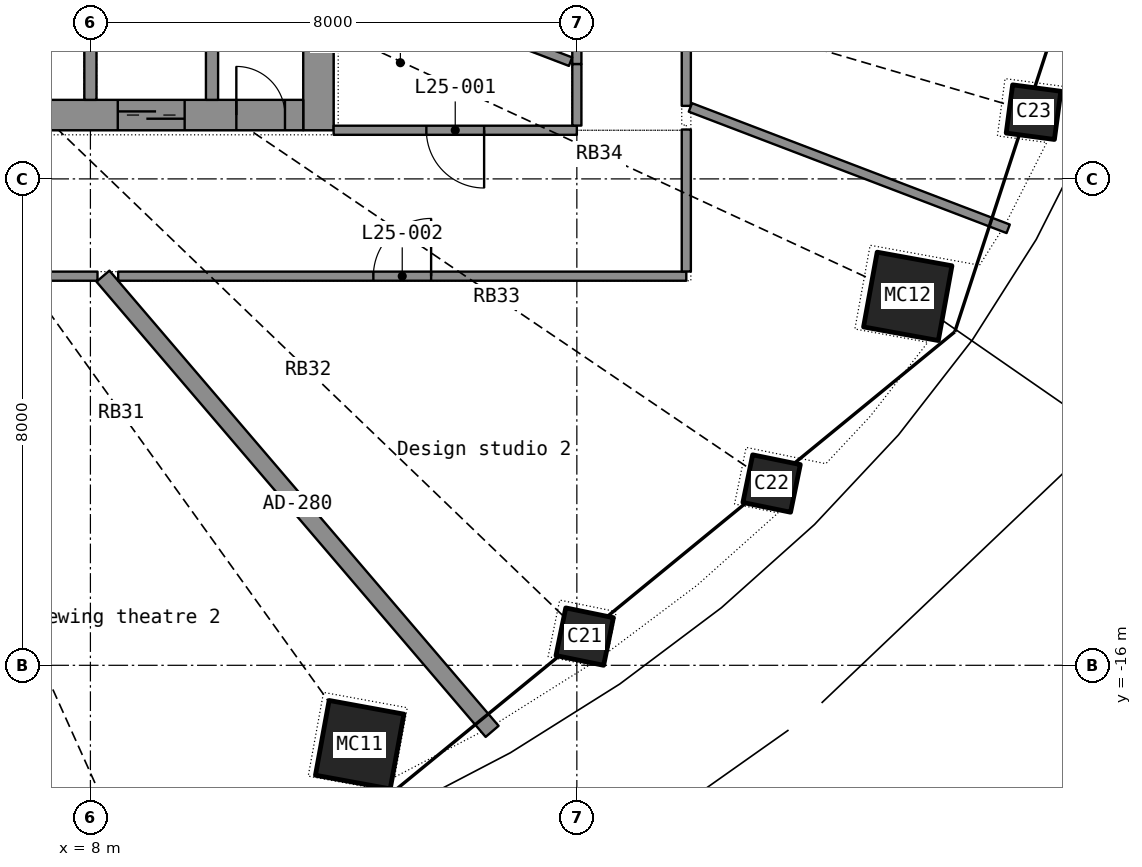
"""IFC4 building model, lengths in metres.
Left out: names, types, materials, properties, quantities, classifications, styles, units other than length and angle.
Written with IfcOpenShell. Run it as: python <this file> out.ifc"""

import sys

from ifc_helpers import new_model, si_unit, direction, frame, frame_2d, origin, origin_2d, place, context, subcontext, project, spatial, rectangle, hollow_rectangle, extrude, element, fill, save


model = new_model("IFC4")
c1 = context("Model", 3, precision=1e-05, world=origin(), true_north=direction((0.0, 1.0)))
c2 = subcontext(c1, "Body", "Model", "MODEL_VIEW")
j1 = project(units=[si_unit("LENGTHUNIT", "METRE"), si_unit("PLANEANGLEUNIT", "RADIAN")], contexts=[c1])
p1 = place(None, origin())
s1 = spatial("IfcSite", under=j1, at=p1, CompositionType="ELEMENT")
p2 = place(p1, origin())
s2 = spatial("IfcBuilding", under=s1, at=p2, CompositionType="ELEMENT")
p3 = place(p2, frame((0.0, 0.0, 108.2)))
s3 = spatial("IfcBuildingStorey", under=s2, at=p3, CompositionType="ELEMENT", Elevation=108.2)
p4 = place(p3, frame((12.428, -17.305, 0.0), z_axis=(-0.017280237, 0.024535299, 0.999549605), x_axis=(-0.907861934, -0.419234423, -0.005404462)))
e1 = element("IfcColumn", 1, at=p4, inside=s3, PredefinedType="COLUMN", context=c2, shape_type="SweptSolid", body=[
    extrude(hollow_rectangle(XDim=1.25, YDim=1.25, WallThickness=0.032, at=origin_2d()), origin(), (0.0, 0.0, 1.0), 3.702),
])
p5 = place(p3, frame((16.129, -15.528, 0.0), z_axis=(-0.022226124, 0.021764453, 0.999516037), x_axis=(-0.828818938, -0.559482024, -0.006247635)))
e2 = element("IfcColumn", 2, at=p5, inside=s3, PredefinedType="COLUMN", context=c2, shape_type="SweptSolid", body=[
    extrude(hollow_rectangle(XDim=0.8, YDim=0.8, WallThickness=0.025, at=origin_2d()), origin(), (0.0, 0.0, 1.0), 3.702),
])
p6 = place(p3, frame((19.203, -13.01, 0.0), z_axis=(-0.026512179, 0.018202391, 0.999482755), x_axis=(-0.719802207, -0.694149234, -0.006451686)))
e3 = element("IfcColumn", 3, at=p6, inside=s3, PredefinedType="COLUMN", context=c2, shape_type="SweptSolid", body=[
    extrude(hollow_rectangle(XDim=0.8, YDim=0.8, WallThickness=0.025, at=origin_2d()), origin(), (0.0, 0.0, 1.0), 3.702),
])
p7 = place(p3, frame((21.442, -9.932, 0.0), z_axis=(-0.029940667, 0.01417895, 0.999451106), x_axis=(-0.582966761, -0.812474307, -0.00593764)))
e4 = element("IfcColumn", 4, at=p7, inside=s3, PredefinedType="COLUMN", context=c2, shape_type="SweptSolid", body=[
    extrude(hollow_rectangle(XDim=1.25, YDim=1.25, WallThickness=0.032, at=origin_2d()), origin(), (0.0, 0.0, 1.0), 3.702),
])
p8 = place(p3, frame((23.51, -6.902, 0.0), z_axis=(-0.032511791, 0.009694185, 0.999424337), x_axis=(-0.409837945, -0.912147328, -0.004484622)))
e5 = element("IfcColumn", 5, at=p8, inside=s3, PredefinedType="COLUMN", context=c2, shape_type="SweptSolid", body=[
    extrude(hollow_rectangle(XDim=0.8, YDim=0.8, WallThickness=0.025, at=origin_2d()), origin(), (0.0, 0.0, 1.0), 3.702),
])
p9 = place(p3, frame((11.75, -7.2, 0.0), z_axis=(0.0, 0.0, 1.0), x_axis=(0.0, 1.0, 0.0)))
e6 = element("IfcWall", 6, at=p9, inside=s3, PredefinedType="SHEAR", context=c2, shape_type="SweptSolid", body=[
    extrude(rectangle(XDim=14.4, YDim=0.5, at=frame_2d((7.2, 0.0))), origin(), (0.0, 0.0, 1.0), 3.3),
])
p10 = place(p9, frame((6.5, 0.0, 0.0)))
e7 = element("IfcOpeningElement", 7, at=p10, cuts=e6, PredefinedType="OPENING", context=c2, shape_type="SweptSolid", body=[
    extrude(rectangle(XDim=1.4, YDim=2.2, at=frame_2d((0.7, 1.1))), frame((0.0, 0.26, 0.0), z_axis=(0.0, -1.0, 0.0), x_axis=(1.0, 0.0, 0.0)), (0.0, 0.0, 1.0), 0.52),
])
p11 = place(p3, frame((-11.5, -6.95, 0.0), z_axis=(0.0, 0.0, 1.0), x_axis=(1.0, 0.0, 0.0)))
e8 = element("IfcWall", 8, at=p11, inside=s3, PredefinedType="SHEAR", context=c2, shape_type="SweptSolid", body=[
    extrude(rectangle(XDim=23.0, YDim=0.5, at=frame_2d((11.5, 0.0))), origin(), (0.0, 0.0, 1.0), 3.3),
])
p12 = place(p11, frame((1.95, 0.0, 0.0)))
e9 = element("IfcOpeningElement", 9, at=p12, cuts=e8, PredefinedType="OPENING", context=c2, shape_type="SweptSolid", body=[
    extrude(rectangle(XDim=1.1, YDim=2.2, at=frame_2d((0.55, 1.1))), frame((0.0, 0.26, 0.0), z_axis=(0.0, -1.0, 0.0), x_axis=(1.0, 0.0, 0.0)), (0.0, 0.0, 1.0), 0.52),
])
p13 = place(p11, frame((3.95, 0.0, 0.0)))
e10 = element("IfcOpeningElement", 10, at=p13, cuts=e8, PredefinedType="OPENING", context=c2, shape_type="SweptSolid", body=[
    extrude(rectangle(XDim=1.1, YDim=2.2, at=frame_2d((0.55, 1.1))), frame((0.0, 0.26, 0.0), z_axis=(0.0, -1.0, 0.0), x_axis=(1.0, 0.0, 0.0)), (0.0, 0.0, 1.0), 0.52),
])
p14 = place(p11, frame((5.95, 0.0, 0.0)))
e11 = element("IfcOpeningElement", 11, at=p14, cuts=e8, PredefinedType="OPENING", context=c2, shape_type="SweptSolid", body=[
    extrude(rectangle(XDim=1.1, YDim=2.2, at=frame_2d((0.55, 1.1))), frame((0.0, 0.26, 0.0), z_axis=(0.0, -1.0, 0.0), x_axis=(1.0, 0.0, 0.0)), (0.0, 0.0, 1.0), 0.52),
])
p15 = place(p11, frame((7.95, 0.0, 0.0)))
e12 = element("IfcOpeningElement", 12, at=p15, cuts=e8, PredefinedType="OPENING", context=c2, shape_type="SweptSolid", body=[
    extrude(rectangle(XDim=1.1, YDim=2.2, at=frame_2d((0.55, 1.1))), frame((0.0, 0.26, 0.0), z_axis=(0.0, -1.0, 0.0), x_axis=(1.0, 0.0, 0.0)), (0.0, 0.0, 1.0), 0.52),
])
p16 = place(p11, frame((9.95, 0.0, 0.0)))
e13 = element("IfcOpeningElement", 13, at=p16, cuts=e8, PredefinedType="OPENING", context=c2, shape_type="SweptSolid", body=[
    extrude(rectangle(XDim=1.1, YDim=2.2, at=frame_2d((0.55, 1.1))), frame((0.0, 0.26, 0.0), z_axis=(0.0, -1.0, 0.0), x_axis=(1.0, 0.0, 0.0)), (0.0, 0.0, 1.0), 0.52),
])
p17 = place(p11, frame((11.95, 0.0, 0.0)))
e14 = element("IfcOpeningElement", 14, at=p17, cuts=e8, PredefinedType="OPENING", context=c2, shape_type="SweptSolid", body=[
    extrude(rectangle(XDim=1.1, YDim=2.2, at=frame_2d((0.55, 1.1))), frame((0.0, 0.26, 0.0), z_axis=(0.0, -1.0, 0.0), x_axis=(1.0, 0.0, 0.0)), (0.0, 0.0, 1.0), 0.52),
])
p18 = place(p11, frame((13.95, 0.0, 0.0)))
e15 = element("IfcOpeningElement", 15, at=p18, cuts=e8, PredefinedType="OPENING", context=c2, shape_type="SweptSolid", body=[
    extrude(rectangle(XDim=1.1, YDim=2.2, at=frame_2d((0.55, 1.1))), frame((0.0, 0.26, 0.0), z_axis=(0.0, -1.0, 0.0), x_axis=(1.0, 0.0, 0.0)), (0.0, 0.0, 1.0), 0.52),
])
p19 = place(p11, frame((15.95, 0.0, 0.0)))
e16 = element("IfcOpeningElement", 16, at=p19, cuts=e8, PredefinedType="OPENING", context=c2, shape_type="SweptSolid", body=[
    extrude(rectangle(XDim=1.1, YDim=2.2, at=frame_2d((0.55, 1.1))), frame((0.0, 0.26, 0.0), z_axis=(0.0, -1.0, 0.0), x_axis=(1.0, 0.0, 0.0)), (0.0, 0.0, 1.0), 0.52),
])
p20 = place(p11, frame((19.95, 0.0, 0.0)))
e17 = element("IfcOpeningElement", 17, at=p20, cuts=e8, PredefinedType="OPENING", context=c2, shape_type="SweptSolid", body=[
    extrude(rectangle(XDim=1.1, YDim=2.2, at=frame_2d((0.55, 1.1))), frame((0.0, 0.26, 0.0), z_axis=(0.0, -1.0, 0.0), x_axis=(1.0, 0.0, 0.0)), (0.0, 0.0, 1.0), 0.52),
])
p21 = place(p11, frame((0.3, 0.0, 0.0)))
e18 = element("IfcOpeningElement", 18, at=p21, cuts=e8, PredefinedType="OPENING", context=c2, shape_type="SweptSolid", body=[
    extrude(rectangle(XDim=0.8, YDim=2.05, at=frame_2d((0.4, 1.025))), frame((0.0, 0.26, 0.0), z_axis=(0.0, -1.0, 0.0), x_axis=(1.0, 0.0, 0.0)), (0.0, 0.0, 1.0), 0.52),
])
p22 = place(p11, frame((21.9, 0.0, 0.0)))
e19 = element("IfcOpeningElement", 19, at=p22, cuts=e8, PredefinedType="OPENING", context=c2, shape_type="SweptSolid", body=[
    extrude(rectangle(XDim=0.8, YDim=2.05, at=frame_2d((0.4, 1.025))), frame((0.0, 0.26, 0.0), z_axis=(0.0, -1.0, 0.0), x_axis=(1.0, 0.0, 0.0)), (0.0, 0.0, 1.0), 0.52),
])
for number, where, z_axis, x_axis in (
    (20, (8.0, -6.7, 0.0), (0.0, 0.0, 1.0), (0.0, 1.0, 0.0)),
    (21, (10.0, -6.7, 0.0), (0.0, 0.0, 1.0), (0.0, 1.0, 0.0)),
):
    element("IfcWall", number, at=place(p3, frame(where, z_axis=z_axis, x_axis=x_axis)), inside=s3, PredefinedType="SHEAR", context=c2, shape_type="SweptSolid", body=[
        extrude(rectangle(XDim=2.8, YDim=0.2, at=frame_2d((1.4, 0.0))), origin(), (0.0, 0.0, 1.0), 3.3),
    ])
p23 = place(p3, frame((17.8, -6.799, 0.0), z_axis=(0.0, 0.0, 1.0), x_axis=(0.0, 1.0, 0.0)))
e22 = element("IfcWall", 22, at=p23, inside=s3, PredefinedType="PARTITIONING", context=c2, shape_type="SweptSolid", body=[
    extrude(rectangle(XDim=13.598, YDim=0.15, at=frame_2d((6.799, 0.0))), origin(), (0.0, 0.0, 1.0), 2.4),
])
p24 = place(p23, frame((6.199, 0.0, 0.0)))
e23 = element("IfcOpeningElement", 23, at=p24, cuts=e22, PredefinedType="OPENING", context=c2, shape_type="SweptSolid", body=[
    extrude(rectangle(XDim=1.2, YDim=2.2, at=frame_2d((0.6, 1.1))), frame((0.0, 0.085, 0.0), z_axis=(0.0, -1.0, 0.0), x_axis=(1.0, 0.0, 0.0)), (0.0, 0.0, 1.0), 0.17),
])
p25 = place(p3, frame((8.206, -9.6, 0.0), z_axis=(0.0, 0.0, 1.0), x_axis=(0.649790619, -0.760113249, 0.0)))
e24 = element("IfcWall", 24, at=p25, inside=s3, PredefinedType="PARTITIONING", context=c2, shape_type="SweptSolid", body=[
    extrude(rectangle(XDim=9.85, YDim=0.28, at=frame_2d((4.925, 0.0))), origin(), (0.0, 0.0, 1.0), 2.4),
])
p26 = place(p3, frame((8.457, -9.6, 0.0), z_axis=(0.0, 0.0, 1.0), x_axis=(1.0, 0.0, 0.0)))
e25 = element("IfcWall", 25, at=p26, inside=s3, PredefinedType="PARTITIONING", context=c2, shape_type="SweptSolid", body=[
    extrude(rectangle(XDim=9.343, YDim=0.15, at=frame_2d((4.672, 0.0))), origin(), (0.0, 0.0, 1.0), 2.4),
])
p27 = place(p26, frame((4.197, 0.0, 0.0)))
e26 = element("IfcOpeningElement", 26, at=p27, cuts=e25, PredefinedType="OPENING", context=c2, shape_type="SweptSolid", body=[
    extrude(rectangle(XDim=0.95, YDim=2.15, at=frame_2d((0.475, 1.075))), frame((0.0, 0.085, 0.0), z_axis=(0.0, -1.0, 0.0), x_axis=(1.0, 0.0, 0.0)), (0.0, 0.0, 1.0), 0.17),
])
p28 = place(p3, frame((23.094, -8.821, 0.0), z_axis=(0.0, 0.0, 1.0), x_axis=(-0.934174226, 0.356817201, 0.0)))
e27 = element("IfcWall", 27, at=p28, inside=s3, PredefinedType="PARTITIONING", context=c2, shape_type="SweptSolid", body=[
    extrude(rectangle(XDim=5.595, YDim=0.15, at=frame_2d((2.797, 0.0))), origin(), (0.0, 0.0, 1.0), 2.4),
])
p29 = place(p3, frame((16.0, -0.9, 0.0), z_axis=(0.0, 0.0, 1.0), x_axis=(0.0, -1.0, 0.0)))
e28 = element("IfcWall", 28, at=p29, inside=s3, PredefinedType="PARTITIONING", context=c2, shape_type="SweptSolid", body=[
    extrude(rectangle(XDim=5.211, YDim=0.15, at=frame_2d((2.606, 0.0))), origin(), (0.0, 0.0, 1.0), 2.4),
])
p30 = place(p29, frame((2.006, 0.0, 0.0)))
e29 = element("IfcOpeningElement", 29, at=p30, cuts=e28, PredefinedType="OPENING", context=c2, shape_type="SweptSolid", body=[
    extrude(rectangle(XDim=1.2, YDim=2.2, at=frame_2d((0.6, 1.1))), frame((0.0, 0.085, 0.0), z_axis=(0.0, -1.0, 0.0), x_axis=(1.0, 0.0, 0.0)), (0.0, 0.0, 1.0), 0.17),
])
p31 = place(p3, frame((3.314, -9.6, 0.0), z_axis=(0.0, 0.0, 1.0), x_axis=(1.0, 0.0, 0.0)))
e30 = element("IfcWall", 30, at=p31, inside=s3, PredefinedType="PARTITIONING", context=c2, shape_type="SweptSolid", body=[
    extrude(rectangle(XDim=4.802, YDim=0.15, at=frame_2d((2.401, 0.0))), origin(), (0.0, 0.0, 1.0), 2.4),
])
p32 = place(p31, frame((1.901, 0.0, 0.0)))
e31 = element("IfcOpeningElement", 31, at=p32, cuts=e30, PredefinedType="OPENING", context=c2, shape_type="SweptSolid", body=[
    extrude(rectangle(XDim=1.0, YDim=2.2, at=frame_2d((0.5, 1.1))), frame((0.0, 0.085, 0.0), z_axis=(0.0, -1.0, 0.0), x_axis=(1.0, 0.0, 0.0)), (0.0, 0.0, 1.0), 0.17),
])
p33 = place(p3, frame((15.896, -6.072, 0.0), z_axis=(0.0, 0.0, 1.0), x_axis=(-0.934175823, 0.356813021, 0.0)))
e32 = element("IfcWall", 32, at=p33, inside=s3, PredefinedType="PARTITIONING", context=c2, shape_type="SweptSolid", body=[
    extrude(rectangle(XDim=4.171, YDim=0.15, at=frame_2d((2.085, 0.0))), origin(), (0.0, 0.0, 1.0), 2.4),
])
p34 = place(p3, frame((16.0, -7.2, 0.0), z_axis=(0.0, 0.0, 1.0), x_axis=(-1.0, 0.0, 0.0)))
e33 = element("IfcWall", 33, at=p34, inside=s3, PredefinedType="PARTITIONING", context=c2, shape_type="SweptSolid", body=[
    extrude(rectangle(XDim=4.0, YDim=0.15, at=frame_2d((2.0, 0.0))), origin(), (0.0, 0.0, 1.0), 2.4),
])
p35 = place(p34, frame((1.525, 0.0, 0.0)))
e34 = element("IfcOpeningElement", 34, at=p35, cuts=e33, PredefinedType="OPENING", context=c2, shape_type="SweptSolid", body=[
    extrude(rectangle(XDim=0.95, YDim=2.15, at=frame_2d((0.475, 1.075))), frame((0.0, 0.085, 0.0), z_axis=(0.0, -1.0, 0.0), x_axis=(1.0, 0.0, 0.0)), (0.0, 0.0, 1.0), 0.17),
])
p36 = place(p3, frame((17.8, -9.523, 0.0), z_axis=(0.0, 0.0, 1.0), x_axis=(0.0, 1.0, 0.0)))
e35 = element("IfcWall", 35, at=p36, inside=s3, PredefinedType="PARTITIONING", context=c2, shape_type="SweptSolid", body=[
    extrude(rectangle(XDim=2.335, YDim=0.15, at=frame_2d((1.167, 0.0))), origin(), (0.0, 0.0, 1.0), 2.4),
])
p37 = place(p3, frame((16.0, -6.112, 0.0), z_axis=(0.0, 0.0, 1.0), x_axis=(0.0, -1.0, 0.0)))
e36 = element("IfcWall", 36, at=p37, inside=s3, PredefinedType="PARTITIONING", context=c2, shape_type="SweptSolid", body=[
    extrude(rectangle(XDim=1.011, YDim=0.15, at=frame_2d((0.505, 0.0))), origin(), (0.0, 0.0, 1.0), 2.4),
])
p38 = place(p20, origin())
e37 = element("IfcDoor", 37, at=p38, inside=s3, OperationType="DOUBLE_DOOR_SLIDING", PredefinedType="DOOR", context=c2, shape_type="SweptSolid", body=[
    extrude(rectangle(XDim=1.1, YDim=2.2, at=frame_2d((0.55, 1.1))), frame((0.0, 0.025, 0.0), z_axis=(0.0, -1.0, 0.0), x_axis=(1.0, 0.0, 0.0)), (0.0, 0.0, 1.0), 0.05),
])
fill(e17, e37)
p39 = place(p22, origin())
e38 = element("IfcDoor", 38, at=p39, inside=s3, OperationType="SINGLE_SWING_LEFT", PredefinedType="DOOR", context=c2, shape_type="SweptSolid", body=[
    extrude(rectangle(XDim=0.8, YDim=2.05, at=frame_2d((0.4, 1.025))), frame((0.0, 0.025, 0.0), z_axis=(0.0, -1.0, 0.0), x_axis=(1.0, 0.0, 0.0)), (0.0, 0.0, 1.0), 0.05),
])
fill(e19, e38)
p40 = place(p35, origin())
e39 = element("IfcDoor", 39, at=p40, inside=s3, OperationType="SINGLE_SWING_LEFT", PredefinedType="DOOR", context=c2, shape_type="SweptSolid", body=[
    extrude(rectangle(XDim=0.95, YDim=2.15, at=frame_2d((0.475, 1.075))), frame((0.0, 0.025, 0.0), z_axis=(0.0, -1.0, 0.0), x_axis=(1.0, 0.0, 0.0)), (0.0, 0.0, 1.0), 0.05),
])
fill(e34, e39)
p41 = place(p27, origin())
e40 = element("IfcDoor", 40, at=p41, inside=s3, OperationType="SINGLE_SWING_RIGHT", PredefinedType="DOOR", context=c2, shape_type="SweptSolid", body=[
    extrude(rectangle(XDim=0.95, YDim=2.15, at=frame_2d((0.475, 1.075))), frame((0.0, 0.025, 0.0), z_axis=(0.0, -1.0, 0.0), x_axis=(1.0, 0.0, 0.0)), (0.0, 0.0, 1.0), 0.05),
])
fill(e26, e40)
save(model, sys.argv[1])
